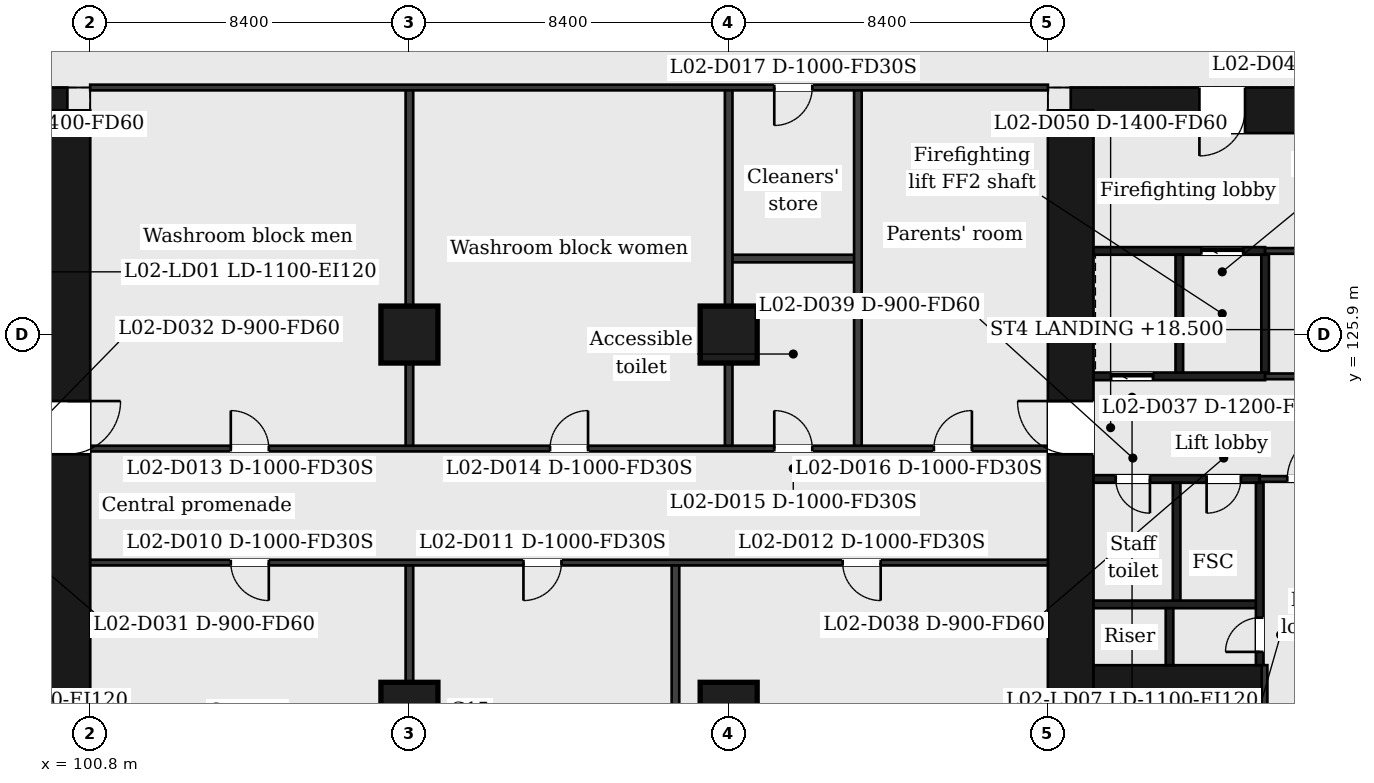
"""IFC4 building model, lengths in metres.
Left out: names, types, materials, properties, quantities, classifications, styles, units other than length and angle.
Written with IfcOpenShell. Run it as: python <this file> out.ifc"""

import sys

from ifc_helpers import new_model, si_unit, direction, frame, frame_2d, origin, origin_2d, place, context, subcontext, project, spatial, rectangle, extrude, element, fill, save


model = new_model("IFC4")
c1 = context("Model", 3, precision=1e-05, world=origin(), true_north=direction((0.0, 1.0)))
c2 = subcontext(c1, "Body", "Model", "MODEL_VIEW")
j1 = project(units=[si_unit("LENGTHUNIT", "METRE"), si_unit("PLANEANGLEUNIT", "RADIAN")], contexts=[c1])
p1 = place(None, origin())
s1 = spatial("IfcSite", under=j1, at=p1, CompositionType="ELEMENT")
p2 = place(p1, origin())
s2 = spatial("IfcBuilding", under=s1, at=p2, CompositionType="ELEMENT")
p3 = place(p2, frame((0.0, 0.0, 17.0)))
s3 = spatial("IfcBuildingStorey", under=s2, at=p3, CompositionType="ELEMENT", Elevation=17.0)
p4 = place(p3, frame((89.156, 131.8, 0.0), z_axis=(0.0, 0.0, 1.0), x_axis=(1.0, 0.0, 0.0)))
e1 = element("IfcWall", 1, at=p4, inside=s3, PredefinedType="SHEAR", context=c2, shape_type="SweptSolid", body=[
    extrude(rectangle(XDim=11.044, YDim=1.2, at=frame_2d((5.522, 0.0))), origin(), (0.0, 0.0, 1.0), 6.0),
])
p5 = place(p4, frame((6.458, 0.0, 0.0)))
e2 = element("IfcOpeningElement", 2, at=p5, cuts=e1, PredefinedType="OPENING", context=c2, shape_type="SweptSolid", body=[
    extrude(rectangle(XDim=1.2, YDim=2.1, at=frame_2d((0.6, 1.05))), frame((0.0, 0.61, 0.0), z_axis=(0.0, -1.0, 0.0), x_axis=(1.0, 0.0, 0.0)), (0.0, 0.0, 1.0), 1.22),
])
p6 = place(p3, frame((100.2, 131.8, 0.0), z_axis=(0.0, 0.0, 1.0), x_axis=(0.0, -1.0, 0.0)))
e3 = element("IfcWall", 3, at=p6, inside=s3, PredefinedType="SHEAR", context=c2, shape_type="SweptSolid", body=[
    extrude(rectangle(XDim=20.8, YDim=1.2, at=frame_2d((10.4, 0.0))), origin(), (0.0, 0.0, 1.0), 6.0),
])
p7 = place(p6, frame((7.65, 0.0, 0.0)))
e4 = element("IfcOpeningElement", 4, at=p7, cuts=e3, PredefinedType="OPENING", context=c2, shape_type="SweptSolid", body=[
    extrude(rectangle(XDim=1.4, YDim=2.1, at=frame_2d((0.7, 1.05))), frame((0.0, 0.61, 0.0), z_axis=(0.0, -1.0, 0.0), x_axis=(1.0, 0.0, 0.0)), (0.0, 0.0, 1.0), 1.22),
])
p8 = place(p3, frame((126.6, 131.8, 0.0), z_axis=(0.0, 0.0, 1.0), x_axis=(1.0, 0.0, 0.0)))
e5 = element("IfcWall", 5, at=p8, inside=s3, PredefinedType="SHEAR", context=c2, shape_type="SweptSolid", body=[
    extrude(rectangle(XDim=11.044, YDim=1.2, at=frame_2d((5.522, 0.0))), origin(), (0.0, 0.0, 1.0), 6.0),
])
p9 = place(p8, frame((3.386, 0.0, 0.0)))
e6 = element("IfcOpeningElement", 6, at=p9, cuts=e5, PredefinedType="OPENING", context=c2, shape_type="SweptSolid", body=[
    extrude(rectangle(XDim=1.2, YDim=2.1, at=frame_2d((0.6, 1.05))), frame((0.0, 0.61, 0.0), z_axis=(0.0, -1.0, 0.0), x_axis=(1.0, 0.0, 0.0)), (0.0, 0.0, 1.0), 1.22),
])
p10 = place(p3, frame((126.6, 111.0, 0.0), z_axis=(0.0, 0.0, 1.0), x_axis=(0.0, 1.0, 0.0)))
e7 = element("IfcWall", 7, at=p10, inside=s3, PredefinedType="SHEAR", context=c2, shape_type="SweptSolid", body=[
    extrude(rectangle(XDim=20.8, YDim=1.2, at=frame_2d((10.4, 0.0))), origin(), (0.0, 0.0, 1.0), 6.0),
])
p11 = place(p10, frame((11.75, 0.0, 0.0)))
e8 = element("IfcOpeningElement", 8, at=p11, cuts=e7, PredefinedType="OPENING", context=c2, shape_type="SweptSolid", body=[
    extrude(rectangle(XDim=1.4, YDim=2.1, at=frame_2d((0.7, 1.05))), frame((0.0, 0.61, 0.0), z_axis=(0.0, -1.0, 0.0), x_axis=(1.0, 0.0, 0.0)), (0.0, 0.0, 1.0), 1.22),
])
p12 = place(p3, frame((127.2, 116.6, 0.0), z_axis=(0.0, 0.0, 1.0), x_axis=(1.0, 0.0, 0.0)))
e9 = element("IfcWall", 9, at=p12, inside=s3, PredefinedType="SHEAR", context=c2, shape_type="SweptSolid", body=[
    extrude(rectangle(XDim=4.5, YDim=1.2, at=frame_2d((2.25, 0.0))), origin(), (0.0, 0.0, 1.0), 6.0),
])
for number, where, z_axis, x_axis in (
    (10, (109.2, 116.0, 0.0), (0.0, 0.0, 1.0), (1.0, 0.0, 0.0)),
    (11, (117.6, 116.0, 0.0), (0.0, 0.0, 1.0), (1.0, 0.0, 0.0)),
    (12, (109.2, 125.9, 0.0), (0.0, 0.0, 1.0), (1.0, 0.0, 0.0)),
    (13, (117.6, 125.9, 0.0), (0.0, 0.0, 1.0), (1.0, 0.0, 0.0)),
):
    element("IfcColumn", number, at=place(p3, frame(where, z_axis=z_axis, x_axis=x_axis)), inside=s3, PredefinedType="COLUMN", context=c2, shape_type="SweptSolid", body=[
        extrude(rectangle(XDim=1.5, YDim=1.5, at=origin_2d()), origin(), (0.0, 0.0, 1.0), 6.0),
    ])
p13 = place(p3, frame((127.2, 118.8, 0.0), z_axis=(0.0, 0.0, 1.0), x_axis=(1.0, 0.0, 0.0)))
e14 = element("IfcWall", 14, at=p13, inside=s3, PredefinedType="PARTITIONING", context=c2, shape_type="SweptSolid", body=[
    extrude(rectangle(XDim=4.373, YDim=0.2, at=frame_2d((2.187, 0.0))), origin(), (0.0, 0.0, 1.0), 5.5),
])
p14 = place(p3, frame((100.8, 119.9, 0.0), z_axis=(0.0, 0.0, 1.0), x_axis=(1.0, 0.0, 0.0)))
e15 = element("IfcWall", 15, at=p14, inside=s3, PredefinedType="PARTITIONING", context=c2, shape_type="SweptSolid", body=[
    extrude(rectangle(XDim=25.2, YDim=0.15, at=frame_2d((12.6, 0.0))), origin(), (0.0, 0.0, 1.0), 5.5),
])
p15 = place(p14, frame((3.7, 0.0, 0.0)))
e16 = element("IfcOpeningElement", 16, at=p15, cuts=e15, PredefinedType="OPENING", context=c2, shape_type="SweptSolid", body=[
    extrude(rectangle(XDim=1.0, YDim=2.1, at=frame_2d((0.5, 1.05))), frame((0.0, 0.085, 0.0), z_axis=(0.0, -1.0, 0.0), x_axis=(1.0, 0.0, 0.0)), (0.0, 0.0, 1.0), 0.17),
])
p16 = place(p14, frame((11.4, 0.0, 0.0)))
e17 = element("IfcOpeningElement", 17, at=p16, cuts=e15, PredefinedType="OPENING", context=c2, shape_type="SweptSolid", body=[
    extrude(rectangle(XDim=1.0, YDim=2.1, at=frame_2d((0.5, 1.05))), frame((0.0, 0.085, 0.0), z_axis=(0.0, -1.0, 0.0), x_axis=(1.0, 0.0, 0.0)), (0.0, 0.0, 1.0), 0.17),
])
p17 = place(p14, frame((19.8, 0.0, 0.0)))
e18 = element("IfcOpeningElement", 18, at=p17, cuts=e15, PredefinedType="OPENING", context=c2, shape_type="SweptSolid", body=[
    extrude(rectangle(XDim=1.0, YDim=2.1, at=frame_2d((0.5, 1.05))), frame((0.0, 0.085, 0.0), z_axis=(0.0, -1.0, 0.0), x_axis=(1.0, 0.0, 0.0)), (0.0, 0.0, 1.0), 0.17),
])
p18 = place(p3, frame((127.2, 122.1, 0.0), z_axis=(0.0, 0.0, 1.0), x_axis=(1.0, 0.0, 0.0)))
e19 = element("IfcWall", 19, at=p18, inside=s3, PredefinedType="PARTITIONING", context=c2, shape_type="SweptSolid", body=[
    extrude(rectangle(XDim=4.373, YDim=0.2, at=frame_2d((2.187, 0.0))), origin(), (0.0, 0.0, 1.0), 5.5),
])
p19 = place(p18, frame((2.976, 0.0, 0.0)))
e20 = element("IfcOpeningElement", 20, at=p19, cuts=e19, PredefinedType="OPENING", context=c2, shape_type="SweptSolid", body=[
    extrude(rectangle(XDim=0.9, YDim=2.1, at=frame_2d((0.45, 1.05))), frame((0.0, 0.11, 0.0), z_axis=(0.0, -1.0, 0.0), x_axis=(1.0, 0.0, 0.0)), (0.0, 0.0, 1.0), 0.22),
])
p20 = place(p18, frame((0.585, 0.0, 0.0)))
e21 = element("IfcOpeningElement", 21, at=p20, cuts=e19, PredefinedType="OPENING", context=c2, shape_type="SweptSolid", body=[
    extrude(rectangle(XDim=0.9, YDim=2.1, at=frame_2d((0.45, 1.05))), frame((0.0, 0.11, 0.0), z_axis=(0.0, -1.0, 0.0), x_axis=(1.0, 0.0, 0.0)), (0.0, 0.0, 1.0), 0.22),
])
p21 = place(p3, frame((131.573, 122.1, 0.0), z_axis=(0.0, 0.0, 1.0), x_axis=(1.0, 0.0, 0.0)))
e22 = element("IfcWall", 22, at=p21, inside=s3, PredefinedType="PARTITIONING", context=c2, shape_type="SweptSolid", body=[
    extrude(rectangle(XDim=2.4, YDim=0.15, at=frame_2d((1.2, 0.0))), origin(), (0.0, 0.0, 1.0), 5.5),
])
p22 = place(p21, frame((0.725, 0.0, 0.0)))
e23 = element("IfcOpeningElement", 23, at=p22, cuts=e22, PredefinedType="OPENING", context=c2, shape_type="SweptSolid", body=[
    extrude(rectangle(XDim=1.2, YDim=2.1, at=frame_2d((0.6, 1.05))), frame((0.0, 0.085, 0.0), z_axis=(0.0, -1.0, 0.0), x_axis=(1.0, 0.0, 0.0)), (0.0, 0.0, 1.0), 0.17),
])
p23 = place(p3, frame((100.8, 122.9, 0.0), z_axis=(0.0, 0.0, 1.0), x_axis=(1.0, 0.0, 0.0)))
e24 = element("IfcWall", 24, at=p23, inside=s3, PredefinedType="PARTITIONING", context=c2, shape_type="SweptSolid", body=[
    extrude(rectangle(XDim=25.2, YDim=0.15, at=frame_2d((12.6, 0.0))), origin(), (0.0, 0.0, 1.0), 5.5),
])
p24 = place(p23, frame((3.7, 0.0, 0.0)))
e25 = element("IfcOpeningElement", 25, at=p24, cuts=e24, PredefinedType="OPENING", context=c2, shape_type="SweptSolid", body=[
    extrude(rectangle(XDim=1.0, YDim=2.1, at=frame_2d((0.5, 1.05))), frame((0.0, 0.085, 0.0), z_axis=(0.0, -1.0, 0.0), x_axis=(1.0, 0.0, 0.0)), (0.0, 0.0, 1.0), 0.17),
])
p25 = place(p23, frame((12.1, 0.0, 0.0)))
e26 = element("IfcOpeningElement", 26, at=p25, cuts=e24, PredefinedType="OPENING", context=c2, shape_type="SweptSolid", body=[
    extrude(rectangle(XDim=1.0, YDim=2.1, at=frame_2d((0.5, 1.05))), frame((0.0, 0.085, 0.0), z_axis=(0.0, -1.0, 0.0), x_axis=(1.0, 0.0, 0.0)), (0.0, 0.0, 1.0), 0.17),
])
p26 = place(p23, frame((18.0, 0.0, 0.0)))
e27 = element("IfcOpeningElement", 27, at=p26, cuts=e24, PredefinedType="OPENING", context=c2, shape_type="SweptSolid", body=[
    extrude(rectangle(XDim=1.0, YDim=2.1, at=frame_2d((0.5, 1.05))), frame((0.0, 0.085, 0.0), z_axis=(0.0, -1.0, 0.0), x_axis=(1.0, 0.0, 0.0)), (0.0, 0.0, 1.0), 0.17),
])
p27 = place(p23, frame((22.2, 0.0, 0.0)))
e28 = element("IfcOpeningElement", 28, at=p27, cuts=e24, PredefinedType="OPENING", context=c2, shape_type="SweptSolid", body=[
    extrude(rectangle(XDim=1.0, YDim=2.1, at=frame_2d((0.5, 1.05))), frame((0.0, 0.085, 0.0), z_axis=(0.0, -1.0, 0.0), x_axis=(1.0, 0.0, 0.0)), (0.0, 0.0, 1.0), 0.17),
])
p28 = place(p3, frame((127.2, 124.8, 0.0), z_axis=(0.0, 0.0, 1.0), x_axis=(1.0, 0.0, 0.0)))
e29 = element("IfcWall", 29, at=p28, inside=s3, PredefinedType="PARTITIONING", context=c2, shape_type="SweptSolid", body=[
    extrude(rectangle(XDim=4.515, YDim=0.2, at=frame_2d((2.258, 0.0))), origin(), (0.0, 0.0, 1.0), 5.5),
])
p29 = place(p28, frame((0.464, 0.0, 0.0)))
e30 = element("IfcOpeningElement", 30, at=p29, cuts=e29, PredefinedType="OPENING", context=c2, shape_type="SweptSolid", body=[
    extrude(rectangle(XDim=1.1, YDim=2.1, at=frame_2d((0.55, 1.05))), frame((0.0, 0.11, 0.0), z_axis=(0.0, -1.0, 0.0), x_axis=(1.0, 0.0, 0.0)), (0.0, 0.0, 1.0), 0.22),
])
p30 = place(p3, frame((131.715, 124.8, 0.0), z_axis=(0.0, 0.0, 1.0), x_axis=(1.0, 0.0, 0.0)))
e31 = element("IfcWall", 31, at=p30, inside=s3, PredefinedType="PARTITIONING", context=c2, shape_type="SweptSolid", body=[
    extrude(rectangle(XDim=2.383, YDim=0.15, at=frame_2d((1.191, 0.0))), origin(), (0.0, 0.0, 1.0), 5.5),
])
p31 = place(p3, frame((117.6, 127.9, 0.0), z_axis=(0.0, 0.0, 1.0), x_axis=(1.0, 0.0, 0.0)))
e32 = element("IfcWall", 32, at=p31, inside=s3, PredefinedType="PARTITIONING", context=c2, shape_type="SweptSolid", body=[
    extrude(rectangle(XDim=3.4, YDim=0.2, at=frame_2d((1.7, 0.0))), origin(), (0.0, 0.0, 1.0), 5.5),
])
p32 = place(p3, frame((127.2, 128.1, 0.0), z_axis=(0.0, 0.0, 1.0), x_axis=(1.0, 0.0, 0.0)))
e33 = element("IfcWall", 33, at=p32, inside=s3, PredefinedType="PARTITIONING", context=c2, shape_type="SweptSolid", body=[
    extrude(rectangle(XDim=4.515, YDim=0.2, at=frame_2d((2.258, 0.0))), origin(), (0.0, 0.0, 1.0), 5.5),
])
p33 = place(p32, frame((2.837, 0.0, 0.0)))
e34 = element("IfcOpeningElement", 34, at=p33, cuts=e33, PredefinedType="OPENING", context=c2, shape_type="SweptSolid", body=[
    extrude(rectangle(XDim=1.1, YDim=2.1, at=frame_2d((0.55, 1.05))), frame((0.0, 0.11, 0.0), z_axis=(0.0, -1.0, 0.0), x_axis=(1.0, 0.0, 0.0)), (0.0, 0.0, 1.0), 0.22),
])
p34 = place(p3, frame((131.715, 128.1, 0.0), z_axis=(0.0, 0.0, 1.0), x_axis=(1.0, 0.0, 0.0)))
e35 = element("IfcWall", 35, at=p34, inside=s3, PredefinedType="PARTITIONING", context=c2, shape_type="SweptSolid", body=[
    extrude(rectangle(XDim=2.258, YDim=0.15, at=frame_2d((1.129, 0.0))), origin(), (0.0, 0.0, 1.0), 5.5),
])
p35 = place(p3, frame((100.8, 132.4, 0.0), z_axis=(0.0, 0.0, 1.0), x_axis=(1.0, 0.0, 0.0)))
e36 = element("IfcWall", 36, at=p35, inside=s3, PredefinedType="PARTITIONING", context=c2, shape_type="SweptSolid", body=[
    extrude(rectangle(XDim=25.2, YDim=0.15, at=frame_2d((12.6, 0.0))), origin(), (0.0, 0.0, 1.0), 5.5),
])
p36 = place(p35, frame((18.0, 0.0, 0.0)))
e37 = element("IfcOpeningElement", 37, at=p36, cuts=e36, PredefinedType="OPENING", context=c2, shape_type="SweptSolid", body=[
    extrude(rectangle(XDim=1.0, YDim=2.1, at=frame_2d((0.5, 1.05))), frame((0.0, 0.085, 0.0), z_axis=(0.0, -1.0, 0.0), x_axis=(1.0, 0.0, 0.0)), (0.0, 0.0, 1.0), 0.17),
])
for number, where, z_axis, x_axis in (
    (38, (109.2, 110.475, 0.0), (0.0, 0.0, 1.0), (0.0, 1.0, 0.0)),
    (39, (109.2, 122.975, 0.0), (0.0, 0.0, 1.0), (0.0, 1.0, 0.0)),
    (40, (116.2, 110.475, 0.0), (0.0, 0.0, 1.0), (0.0, 1.0, 0.0)),
    (41, (117.6, 122.975, 0.0), (0.0, 0.0, 1.0), (0.0, 1.0, 0.0)),
    (42, (121.0, 122.975, 0.0), (0.0, 0.0, 1.0), (0.0, 1.0, 0.0)),
):
    element("IfcWall", number, at=place(p3, frame(where, z_axis=z_axis, x_axis=x_axis)), inside=s3, PredefinedType="PARTITIONING", context=c2, shape_type="SweptSolid", body=[
        extrude(rectangle(XDim=9.35, YDim=0.2, at=frame_2d((4.675, 0.0))), origin(), (0.0, 0.0, 1.0), 5.5),
    ])
p37 = place(p3, frame((129.2, 117.2, 0.0), z_axis=(0.0, 0.0, 1.0), x_axis=(0.0, 1.0, 0.0)))
e43 = element("IfcWall", 43, at=p37, inside=s3, PredefinedType="PARTITIONING", context=c2, shape_type="SweptSolid", body=[
    extrude(rectangle(XDim=1.5, YDim=0.2, at=frame_2d((0.75, 0.0))), origin(), (0.0, 0.0, 1.0), 5.5),
])
for number, where, z_axis, x_axis in (
    (44, (129.386, 118.9, 0.0), (0.0, 0.0, 1.0), (0.0, 1.0, 0.0)),
    (45, (129.458, 124.9, 0.0), (0.0, 0.0, 1.0), (0.0, 1.0, 0.0)),
):
    element("IfcWall", number, at=place(p3, frame(where, z_axis=z_axis, x_axis=x_axis)), inside=s3, PredefinedType="PARTITIONING", context=c2, shape_type="SweptSolid", body=[
        extrude(rectangle(XDim=3.1, YDim=0.2, at=frame_2d((1.55, 0.0))), origin(), (0.0, 0.0, 1.0), 5.5),
    ])
p38 = place(p3, frame((131.573, 117.2, 0.0), z_axis=(0.0, 0.0, 1.0), x_axis=(0.0, 1.0, 0.0)))
e46 = element("IfcWall", 46, at=p38, inside=s3, PredefinedType="PARTITIONING", context=c2, shape_type="SweptSolid", body=[
    extrude(rectangle(XDim=4.8, YDim=0.2, at=frame_2d((2.4, 0.0))), origin(), (0.0, 0.0, 1.0), 5.5),
])
p39 = place(p38, frame((0.35, 0.0, 0.0)))
e47 = element("IfcOpeningElement", 47, at=p39, cuts=e46, PredefinedType="OPENING", context=c2, shape_type="SweptSolid", body=[
    extrude(rectangle(XDim=0.9, YDim=2.1, at=frame_2d((0.45, 1.05))), frame((0.0, 0.11, 0.0), z_axis=(0.0, -1.0, 0.0), x_axis=(1.0, 0.0, 0.0)), (0.0, 0.0, 1.0), 0.22),
])
p40 = place(p3, frame((131.7, 116.0, 0.0), z_axis=(0.0, 0.0, 1.0), x_axis=(0.0, 1.0, 0.0)))
e48 = element("IfcWall", 48, at=p40, inside=s3, PredefinedType="PARTITIONING", context=c2, shape_type="SweptSolid", body=[
    extrude(rectangle(XDim=1.2, YDim=0.15, at=frame_2d((0.6, 0.0))), origin(), (0.0, 0.0, 1.0), 5.5),
])
p41 = place(p3, frame((131.715, 124.9, 0.0), z_axis=(0.0, 0.0, 1.0), x_axis=(0.0, 1.0, 0.0)))
e49 = element("IfcWall", 49, at=p41, inside=s3, PredefinedType="PARTITIONING", context=c2, shape_type="SweptSolid", body=[
    extrude(rectangle(XDim=3.1, YDim=0.2, at=frame_2d((1.55, 0.0))), origin(), (0.0, 0.0, 1.0), 5.5),
])
p42 = place(p15, origin())
e50 = element("IfcDoor", 50, at=p42, inside=s3, OperationType="SINGLE_SWING_RIGHT", PredefinedType="DOOR", context=c2, shape_type="SweptSolid", body=[
    extrude(rectangle(XDim=1.0, YDim=2.1, at=frame_2d((0.5, 1.05))), frame((0.0, 0.025, 0.0), z_axis=(0.0, -1.0, 0.0), x_axis=(1.0, 0.0, 0.0)), (0.0, 0.0, 1.0), 0.05),
])
fill(e16, e50)
p43 = place(p16, origin())
e51 = element("IfcDoor", 51, at=p43, inside=s3, OperationType="SINGLE_SWING_LEFT", PredefinedType="DOOR", context=c2, shape_type="SweptSolid", body=[
    extrude(rectangle(XDim=1.0, YDim=2.1, at=frame_2d((0.5, 1.05))), frame((0.0, 0.025, 0.0), z_axis=(0.0, -1.0, 0.0), x_axis=(1.0, 0.0, 0.0)), (0.0, 0.0, 1.0), 0.05),
])
fill(e17, e51)
p44 = place(p17, origin())
e52 = element("IfcDoor", 52, at=p44, inside=s3, OperationType="SINGLE_SWING_RIGHT", PredefinedType="DOOR", context=c2, shape_type="SweptSolid", body=[
    extrude(rectangle(XDim=1.0, YDim=2.1, at=frame_2d((0.5, 1.05))), frame((0.0, 0.025, 0.0), z_axis=(0.0, -1.0, 0.0), x_axis=(1.0, 0.0, 0.0)), (0.0, 0.0, 1.0), 0.05),
])
fill(e18, e52)
p45 = place(p24, origin())
e53 = element("IfcDoor", 53, at=p45, inside=s3, OperationType="SINGLE_SWING_LEFT", PredefinedType="DOOR", context=c2, shape_type="SweptSolid", body=[
    extrude(rectangle(XDim=1.0, YDim=2.1, at=frame_2d((0.5, 1.05))), frame((0.0, 0.025, 0.0), z_axis=(0.0, -1.0, 0.0), x_axis=(1.0, 0.0, 0.0)), (0.0, 0.0, 1.0), 0.05),
])
fill(e25, e53)
p46 = place(p25, origin())
e54 = element("IfcDoor", 54, at=p46, inside=s3, OperationType="SINGLE_SWING_RIGHT", PredefinedType="DOOR", context=c2, shape_type="SweptSolid", body=[
    extrude(rectangle(XDim=1.0, YDim=2.1, at=frame_2d((0.5, 1.05))), frame((0.0, 0.025, 0.0), z_axis=(0.0, -1.0, 0.0), x_axis=(1.0, 0.0, 0.0)), (0.0, 0.0, 1.0), 0.05),
])
fill(e26, e54)
p47 = place(p26, origin())
e55 = element("IfcDoor", 55, at=p47, inside=s3, OperationType="SINGLE_SWING_LEFT", PredefinedType="DOOR", context=c2, shape_type="SweptSolid", body=[
    extrude(rectangle(XDim=1.0, YDim=2.1, at=frame_2d((0.5, 1.05))), frame((0.0, 0.025, 0.0), z_axis=(0.0, -1.0, 0.0), x_axis=(1.0, 0.0, 0.0)), (0.0, 0.0, 1.0), 0.05),
])
fill(e27, e55)
p48 = place(p27, origin())
e56 = element("IfcDoor", 56, at=p48, inside=s3, OperationType="SINGLE_SWING_RIGHT", PredefinedType="DOOR", context=c2, shape_type="SweptSolid", body=[
    extrude(rectangle(XDim=1.0, YDim=2.1, at=frame_2d((0.5, 1.05))), frame((0.0, 0.025, 0.0), z_axis=(0.0, -1.0, 0.0), x_axis=(1.0, 0.0, 0.0)), (0.0, 0.0, 1.0), 0.05),
])
fill(e28, e56)
p49 = place(p36, origin())
e57 = element("IfcDoor", 57, at=p49, inside=s3, OperationType="SINGLE_SWING_LEFT", PredefinedType="DOOR", context=c2, shape_type="SweptSolid", body=[
    extrude(rectangle(XDim=1.0, YDim=2.1, at=frame_2d((0.5, 1.05))), frame((0.0, 0.025, 0.0), z_axis=(0.0, -1.0, 0.0), x_axis=(1.0, 0.0, 0.0)), (0.0, 0.0, 1.0), 0.05),
])
fill(e37, e57)
p50 = place(p22, origin())
e58 = element("IfcDoor", 58, at=p50, inside=s3, OperationType="SINGLE_SWING_RIGHT", PredefinedType="DOOR", context=c2, shape_type="SweptSolid", body=[
    extrude(rectangle(XDim=1.2, YDim=2.1, at=frame_2d((0.6, 1.05))), frame((0.0, 0.025, 0.0), z_axis=(0.0, -1.0, 0.0), x_axis=(1.0, 0.0, 0.0)), (0.0, 0.0, 1.0), 0.05),
])
fill(e23, e58)
p51 = place(p33, origin())
e59 = element("IfcDoor", 59, at=p51, inside=s3, OperationType="SLIDING_TO_LEFT", PredefinedType="DOOR", context=c2, shape_type="SweptSolid", body=[
    extrude(rectangle(XDim=1.1, YDim=2.1, at=frame_2d((0.55, 1.05))), frame((0.0, 0.025, 0.0), z_axis=(0.0, -1.0, 0.0), x_axis=(1.0, 0.0, 0.0)), (0.0, 0.0, 1.0), 0.05),
])
fill(e34, e59)
p52 = place(p29, origin())
e60 = element("IfcDoor", 60, at=p52, inside=s3, OperationType="SLIDING_TO_LEFT", PredefinedType="DOOR", context=c2, shape_type="SweptSolid", body=[
    extrude(rectangle(XDim=1.1, YDim=2.1, at=frame_2d((0.55, 1.05))), frame((0.0, 0.025, 0.0), z_axis=(0.0, -1.0, 0.0), x_axis=(1.0, 0.0, 0.0)), (0.0, 0.0, 1.0), 0.05),
])
fill(e30, e60)
p53 = place(p19, origin())
e61 = element("IfcDoor", 61, at=p53, inside=s3, OperationType="SINGLE_SWING_LEFT", PredefinedType="DOOR", context=c2, shape_type="SweptSolid", body=[
    extrude(rectangle(XDim=0.9, YDim=2.1, at=frame_2d((0.45, 1.05))), frame((0.0, 0.025, 0.0), z_axis=(0.0, -1.0, 0.0), x_axis=(1.0, 0.0, 0.0)), (0.0, 0.0, 1.0), 0.05),
])
fill(e20, e61)
p54 = place(p20, origin())
e62 = element("IfcDoor", 62, at=p54, inside=s3, OperationType="SINGLE_SWING_RIGHT", PredefinedType="DOOR", context=c2, shape_type="SweptSolid", body=[
    extrude(rectangle(XDim=0.9, YDim=2.1, at=frame_2d((0.45, 1.05))), frame((0.0, 0.025, 0.0), z_axis=(0.0, -1.0, 0.0), x_axis=(1.0, 0.0, 0.0)), (0.0, 0.0, 1.0), 0.05),
])
fill(e21, e62)
p55 = place(p39, origin())
e63 = element("IfcDoor", 63, at=p55, inside=s3, OperationType="SINGLE_SWING_LEFT", PredefinedType="DOOR", context=c2, shape_type="SweptSolid", body=[
    extrude(rectangle(XDim=0.9, YDim=2.1, at=frame_2d((0.45, 1.05))), frame((0.0, 0.025, 0.0), z_axis=(0.0, -1.0, 0.0), x_axis=(1.0, 0.0, 0.0)), (0.0, 0.0, 1.0), 0.05),
])
fill(e47, e63)
p56 = place(p7, origin())
e64 = element("IfcDoor", 64, at=p56, inside=s3, OperationType="SINGLE_SWING_LEFT", PredefinedType="DOOR", context=c2, shape_type="SweptSolid", body=[
    extrude(rectangle(XDim=1.4, YDim=2.1, at=frame_2d((0.7, 1.05))), frame((0.0, 0.025, 0.0), z_axis=(0.0, -1.0, 0.0), x_axis=(1.0, 0.0, 0.0)), (0.0, 0.0, 1.0), 0.05),
])
fill(e4, e64)
p57 = place(p9, origin())
e65 = element("IfcDoor", 65, at=p57, inside=s3, OperationType="SINGLE_SWING_LEFT", PredefinedType="DOOR", context=c2, shape_type="SweptSolid", body=[
    extrude(rectangle(XDim=1.2, YDim=2.1, at=frame_2d((0.6, 1.05))), frame((0.0, 0.025, 0.0), z_axis=(0.0, -1.0, 0.0), x_axis=(1.0, 0.0, 0.0)), (0.0, 0.0, 1.0), 0.05),
])
fill(e6, e65)
p58 = place(p11, origin())
e66 = element("IfcDoor", 66, at=p58, inside=s3, OperationType="SINGLE_SWING_RIGHT", PredefinedType="DOOR", context=c2, shape_type="SweptSolid", body=[
    extrude(rectangle(XDim=1.4, YDim=2.1, at=frame_2d((0.7, 1.05))), frame((0.0, 0.025, 0.0), z_axis=(0.0, -1.0, 0.0), x_axis=(1.0, 0.0, 0.0)), (0.0, 0.0, 1.0), 0.05),
])
fill(e8, e66)
save(model, sys.argv[1])
